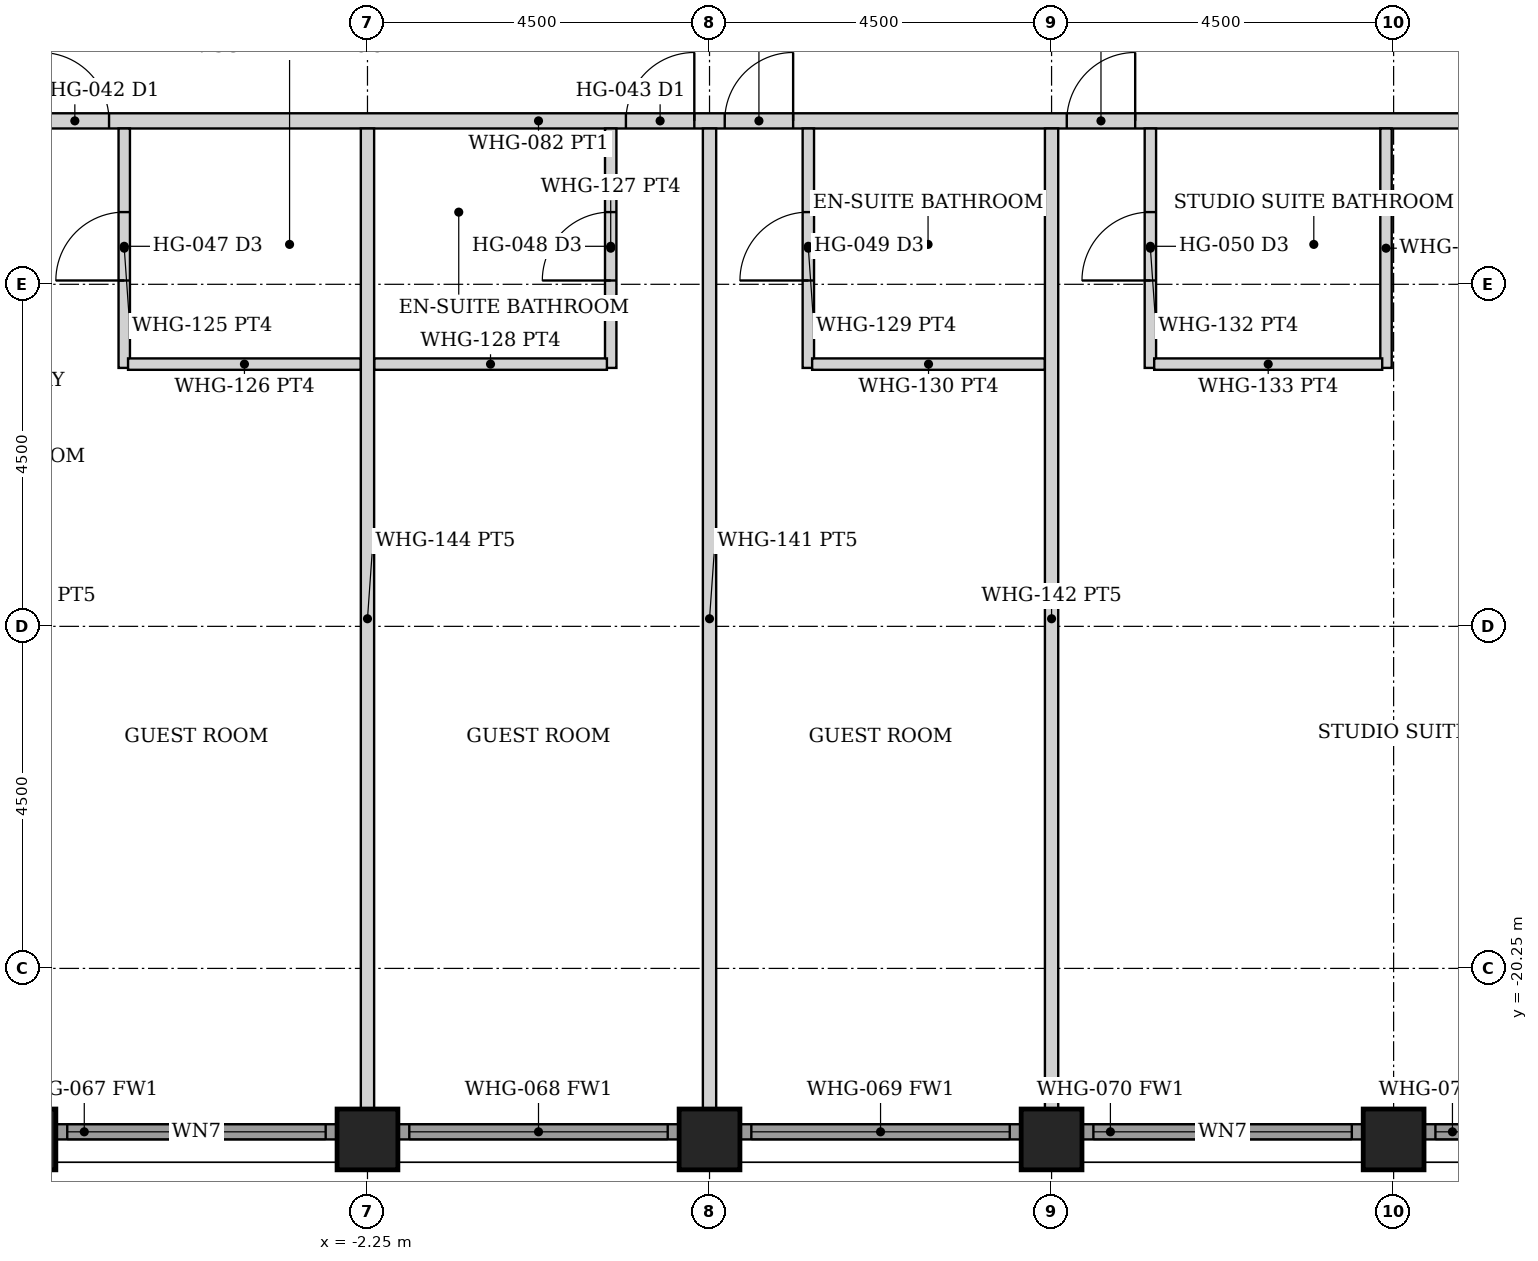
"""IFC4 building model, lengths in metres.
Left out: names, types, materials, properties, quantities, classifications, styles, units other than length and angle.
Written with IfcOpenShell. Run it as: python <this file> out.ifc"""

import sys

from ifc_helpers import new_model, si_unit, direction, frame, frame_2d, origin, origin_2d, place, context, subcontext, project, spatial, rectangle, hollow_rectangle, extrude, element, fill, save


model = new_model("IFC4")
c1 = context("Model", 3, precision=1e-05, world=origin(), true_north=direction((0.0, 1.0)))
c2 = subcontext(c1, "Body", "Model", "MODEL_VIEW")
j1 = project(units=[si_unit("LENGTHUNIT", "METRE"), si_unit("PLANEANGLEUNIT", "RADIAN")], contexts=[c1])
p1 = place(None, origin())
s1 = spatial("IfcSite", under=j1, at=p1, CompositionType="ELEMENT")
p2 = place(p1, origin())
s2 = spatial("IfcBuilding", under=s1, at=p2, CompositionType="ELEMENT")
p3 = place(p2, frame((0.0, 0.0, 186.8)))
s3 = spatial("IfcBuildingStorey", under=s2, at=p3, CompositionType="ELEMENT", Elevation=186.8)
for number, where, z_axis, x_axis in (
    (1, (-6.75, -22.5, 0.0), (0.0, 0.0, 1.0), (0.0, 1.0, 0.0)),
    (2, (-2.25, -22.5, 0.0), (0.0, 0.0, 1.0), (0.0, 1.0, 0.0)),
    (3, (2.25, -22.5, 0.0), (0.0, 0.0, 1.0), (0.0, 1.0, 0.0)),
    (4, (6.75, -22.5, 0.0), (0.0, 0.0, 1.0), (0.0, 1.0, 0.0)),
    (5, (11.25, -22.5, 0.0), (0.0, 0.0, 1.0), (0.0, 1.0, 0.0)),
):
    element("IfcColumn", number, at=place(p3, frame(where, z_axis=z_axis, x_axis=x_axis)), inside=s3, PredefinedType="COLUMN", context=c2, shape_type="SweptSolid", body=[
        extrude(hollow_rectangle(XDim=0.8, YDim=0.8, WallThickness=0.045, at=origin_2d()), origin(), (0.0, 0.0, 1.0), 3.6),
    ])
p4 = place(p3, frame((-6.345, -22.4, 0.0), z_axis=(0.0, 0.0, 1.0), x_axis=(1.0, 0.0, 0.0)))
e6 = element("IfcWall", 6, at=p4, inside=s3, PredefinedType="SOLIDWALL", context=c2, shape_type="SweptSolid", body=[
    extrude(rectangle(XDim=3.69, YDim=0.2, at=frame_2d((1.845, 0.0))), origin(), (0.0, 0.0, 1.0), 2.379),
])
p5 = place(p4, frame((0.145, 0.0, 0.3)))
e7 = element("IfcOpeningElement", 7, at=p5, cuts=e6, PredefinedType="OPENING", context=c2, shape_type="SweptSolid", body=[
    extrude(rectangle(XDim=3.4, YDim=1.929, at=frame_2d((1.7, 0.964))), frame((0.0, 0.11, 0.0), z_axis=(0.0, -1.0, 0.0), x_axis=(1.0, 0.0, 0.0)), (0.0, 0.0, 1.0), 0.22),
])
p6 = place(p3, frame((-1.845, -22.4, 0.0), z_axis=(0.0, 0.0, 1.0), x_axis=(1.0, 0.0, 0.0)))
e8 = element("IfcWall", 8, at=p6, inside=s3, PredefinedType="SOLIDWALL", context=c2, shape_type="SweptSolid", body=[
    extrude(rectangle(XDim=3.69, YDim=0.2, at=frame_2d((1.845, 0.0))), origin(), (0.0, 0.0, 1.0), 2.379),
])
p7 = place(p6, frame((0.145, 0.0, 0.3)))
e9 = element("IfcOpeningElement", 9, at=p7, cuts=e8, PredefinedType="OPENING", context=c2, shape_type="SweptSolid", body=[
    extrude(rectangle(XDim=3.4, YDim=1.929, at=frame_2d((1.7, 0.964))), frame((0.0, 0.11, 0.0), z_axis=(0.0, -1.0, 0.0), x_axis=(1.0, 0.0, 0.0)), (0.0, 0.0, 1.0), 0.22),
])
p8 = place(p3, frame((2.655, -22.4, 0.0), z_axis=(0.0, 0.0, 1.0), x_axis=(1.0, 0.0, 0.0)))
e10 = element("IfcWall", 10, at=p8, inside=s3, PredefinedType="SOLIDWALL", context=c2, shape_type="SweptSolid", body=[
    extrude(rectangle(XDim=3.69, YDim=0.2, at=frame_2d((1.845, 0.0))), origin(), (0.0, 0.0, 1.0), 2.379),
])
p9 = place(p8, frame((0.145, 0.0, 0.3)))
e11 = element("IfcOpeningElement", 11, at=p9, cuts=e10, PredefinedType="OPENING", context=c2, shape_type="SweptSolid", body=[
    extrude(rectangle(XDim=3.4, YDim=1.929, at=frame_2d((1.7, 0.964))), frame((0.0, 0.11, 0.0), z_axis=(0.0, -1.0, 0.0), x_axis=(1.0, 0.0, 0.0)), (0.0, 0.0, 1.0), 0.22),
])
p10 = place(p3, frame((7.155, -22.4, 0.0), z_axis=(0.0, 0.0, 1.0), x_axis=(1.0, 0.0, 0.0)))
e12 = element("IfcWall", 12, at=p10, inside=s3, PredefinedType="SOLIDWALL", context=c2, shape_type="SweptSolid", body=[
    extrude(rectangle(XDim=3.69, YDim=0.2, at=frame_2d((1.845, 0.0))), origin(), (0.0, 0.0, 1.0), 2.379),
])
p11 = place(p10, frame((0.145, 0.0, 0.3)))
e13 = element("IfcOpeningElement", 13, at=p11, cuts=e12, PredefinedType="OPENING", context=c2, shape_type="SweptSolid", body=[
    extrude(rectangle(XDim=3.4, YDim=1.929, at=frame_2d((1.7, 0.964))), frame((0.0, 0.11, 0.0), z_axis=(0.0, -1.0, 0.0), x_axis=(1.0, 0.0, 0.0)), (0.0, 0.0, 1.0), 0.22),
])
p12 = place(p3, frame((11.655, -22.4, 0.0), z_axis=(0.0, 0.0, 1.0), x_axis=(1.0, 0.0, 0.0)))
e14 = element("IfcWall", 14, at=p12, inside=s3, PredefinedType="SOLIDWALL", context=c2, shape_type="SweptSolid", body=[
    extrude(rectangle(XDim=3.69, YDim=0.2, at=frame_2d((1.845, 0.0))), origin(), (0.0, 0.0, 1.0), 2.379),
])
p13 = place(p12, frame((0.145, 0.0, 0.3)))
e15 = element("IfcOpeningElement", 15, at=p13, cuts=e14, PredefinedType="OPENING", context=c2, shape_type="SweptSolid", body=[
    extrude(rectangle(XDim=3.4, YDim=1.929, at=frame_2d((1.7, 0.964))), frame((0.0, 0.11, 0.0), z_axis=(0.0, -1.0, 0.0), x_axis=(1.0, 0.0, 0.0)), (0.0, 0.0, 1.0), 0.22),
])
p14 = place(p3, frame((-22.3, -9.1, 0.0), z_axis=(0.0, 0.0, 1.0), x_axis=(1.0, 0.0, 0.0)))
e16 = element("IfcWall", 16, at=p14, inside=s3, PredefinedType="PARTITIONING", context=c2, shape_type="SweptSolid", body=[
    extrude(rectangle(XDim=44.6, YDim=0.2, at=frame_2d((22.3, 0.0))), origin(), (0.0, 0.0, 1.0), 2.379),
])
p15 = place(p14, frame((11.35, 0.0, 0.0)))
e17 = element("IfcOpeningElement", 17, at=p15, cuts=e16, PredefinedType="OPENING", context=c2, shape_type="SweptSolid", body=[
    extrude(rectangle(XDim=0.9, YDim=2.1, at=frame_2d((0.45, 1.05))), frame((0.0, 0.11, 0.0), z_axis=(0.0, -1.0, 0.0), x_axis=(1.0, 0.0, 0.0)), (0.0, 0.0, 1.0), 0.22),
])
p16 = place(p14, frame((15.75, 0.0, 0.0)))
e18 = element("IfcOpeningElement", 18, at=p16, cuts=e16, PredefinedType="OPENING", context=c2, shape_type="SweptSolid", body=[
    extrude(rectangle(XDim=0.9, YDim=2.1, at=frame_2d((0.45, 1.05))), frame((0.0, 0.11, 0.0), z_axis=(0.0, -1.0, 0.0), x_axis=(1.0, 0.0, 0.0)), (0.0, 0.0, 1.0), 0.22),
])
p17 = place(p14, frame((23.45, 0.0, 0.0)))
e19 = element("IfcOpeningElement", 19, at=p17, cuts=e16, PredefinedType="OPENING", context=c2, shape_type="SweptSolid", body=[
    extrude(rectangle(XDim=0.9, YDim=2.1, at=frame_2d((0.45, 1.05))), frame((0.0, 0.11, 0.0), z_axis=(0.0, -1.0, 0.0), x_axis=(1.0, 0.0, 0.0)), (0.0, 0.0, 1.0), 0.22),
])
p18 = place(p14, frame((24.75, 0.0, 0.0)))
e20 = element("IfcOpeningElement", 20, at=p18, cuts=e16, PredefinedType="OPENING", context=c2, shape_type="SweptSolid", body=[
    extrude(rectangle(XDim=0.9, YDim=2.1, at=frame_2d((0.45, 1.05))), frame((0.0, 0.11, 0.0), z_axis=(0.0, -1.0, 0.0), x_axis=(1.0, 0.0, 0.0)), (0.0, 0.0, 1.0), 0.22),
])
p19 = place(p14, frame((29.25, 0.0, 0.0)))
e21 = element("IfcOpeningElement", 21, at=p19, cuts=e16, PredefinedType="OPENING", context=c2, shape_type="SweptSolid", body=[
    extrude(rectangle(XDim=0.9, YDim=2.1, at=frame_2d((0.45, 1.05))), frame((0.0, 0.11, 0.0), z_axis=(0.0, -1.0, 0.0), x_axis=(1.0, 0.0, 0.0)), (0.0, 0.0, 1.0), 0.22),
])
p20 = place(p14, frame((38.85, 0.0, 0.0)))
e22 = element("IfcOpeningElement", 22, at=p20, cuts=e16, PredefinedType="OPENING", context=c2, shape_type="SweptSolid", body=[
    extrude(rectangle(XDim=0.9, YDim=2.1, at=frame_2d((0.45, 1.05))), frame((0.0, 0.11, 0.0), z_axis=(0.0, -1.0, 0.0), x_axis=(1.0, 0.0, 0.0)), (0.0, 0.0, 1.0), 0.22),
])
p21 = place(p14, frame((4.85, 0.0, 0.0)))
e23 = element("IfcOpeningElement", 23, at=p21, cuts=e16, PredefinedType="OPENING", context=c2, shape_type="SweptSolid", body=[
    extrude(rectangle(XDim=0.9, YDim=2.1, at=frame_2d((0.45, 1.05))), frame((0.0, 0.11, 0.0), z_axis=(0.0, -1.0, 0.0), x_axis=(1.0, 0.0, 0.0)), (0.0, 0.0, 1.0), 0.22),
])
p22 = place(p3, frame((-5.45, -12.35, 0.0), z_axis=(0.0, 0.0, 1.0), x_axis=(0.0, 1.0, 0.0)))
e24 = element("IfcWall", 24, at=p22, inside=s3, PredefinedType="PARTITIONING", context=c2, shape_type="SweptSolid", body=[
    extrude(rectangle(XDim=3.15, YDim=0.15, at=frame_2d((1.575, 0.0))), origin(), (0.0, 0.0, 1.0), 2.379),
])
p23 = place(p22, frame((1.15, 0.0, 0.0)))
e25 = element("IfcOpeningElement", 25, at=p23, cuts=e24, PredefinedType="OPENING", context=c2, shape_type="SweptSolid", body=[
    extrude(rectangle(XDim=0.9, YDim=2.1, at=frame_2d((0.45, 1.05))), frame((0.0, 0.085, 0.0), z_axis=(0.0, -1.0, 0.0), x_axis=(1.0, 0.0, 0.0)), (0.0, 0.0, 1.0), 0.17),
])
p24 = place(p3, frame((-5.4, -12.3, 0.0), z_axis=(0.0, 0.0, 1.0), x_axis=(1.0, 0.0, 0.0)))
e26 = element("IfcWall", 26, at=p24, inside=s3, PredefinedType="PARTITIONING", context=c2, shape_type="SweptSolid", body=[
    extrude(rectangle(XDim=3.062, YDim=0.15, at=frame_2d((1.531, 0.0))), origin(), (0.0, 0.0, 1.0), 2.379),
])
p25 = place(p3, frame((0.95, -12.35, 0.0), z_axis=(0.0, 0.0, 1.0), x_axis=(0.0, 1.0, 0.0)))
e27 = element("IfcWall", 27, at=p25, inside=s3, PredefinedType="PARTITIONING", context=c2, shape_type="SweptSolid", body=[
    extrude(rectangle(XDim=3.15, YDim=0.15, at=frame_2d((1.575, 0.0))), origin(), (0.0, 0.0, 1.0), 2.379),
])
p26 = place(p25, frame((1.15, 0.0, 0.0)))
e28 = element("IfcOpeningElement", 28, at=p26, cuts=e27, PredefinedType="OPENING", context=c2, shape_type="SweptSolid", body=[
    extrude(rectangle(XDim=0.9, YDim=2.1, at=frame_2d((0.45, 1.05))), frame((0.0, 0.085, 0.0), z_axis=(0.0, -1.0, 0.0), x_axis=(1.0, 0.0, 0.0)), (0.0, 0.0, 1.0), 0.17),
])
p27 = place(p3, frame((-2.163, -12.3, 0.0), z_axis=(0.0, 0.0, 1.0), x_axis=(1.0, 0.0, 0.0)))
e29 = element("IfcWall", 29, at=p27, inside=s3, PredefinedType="PARTITIONING", context=c2, shape_type="SweptSolid", body=[
    extrude(rectangle(XDim=3.062, YDim=0.15, at=frame_2d((1.531, 0.0))), origin(), (0.0, 0.0, 1.0), 2.379),
])
p28 = place(p3, frame((3.55, -12.35, 0.0), z_axis=(0.0, 0.0, 1.0), x_axis=(0.0, 1.0, 0.0)))
e30 = element("IfcWall", 30, at=p28, inside=s3, PredefinedType="PARTITIONING", context=c2, shape_type="SweptSolid", body=[
    extrude(rectangle(XDim=3.15, YDim=0.15, at=frame_2d((1.575, 0.0))), origin(), (0.0, 0.0, 1.0), 2.379),
])
p29 = place(p28, frame((1.15, 0.0, 0.0)))
e31 = element("IfcOpeningElement", 31, at=p29, cuts=e30, PredefinedType="OPENING", context=c2, shape_type="SweptSolid", body=[
    extrude(rectangle(XDim=0.9, YDim=2.1, at=frame_2d((0.45, 1.05))), frame((0.0, 0.085, 0.0), z_axis=(0.0, -1.0, 0.0), x_axis=(1.0, 0.0, 0.0)), (0.0, 0.0, 1.0), 0.17),
])
p30 = place(p3, frame((3.6, -12.3, 0.0), z_axis=(0.0, 0.0, 1.0), x_axis=(1.0, 0.0, 0.0)))
e32 = element("IfcWall", 32, at=p30, inside=s3, PredefinedType="PARTITIONING", context=c2, shape_type="SweptSolid", body=[
    extrude(rectangle(XDim=3.062, YDim=0.15, at=frame_2d((1.531, 0.0))), origin(), (0.0, 0.0, 1.0), 2.379),
])
p31 = place(p3, frame((8.05, -12.35, 0.0), z_axis=(0.0, 0.0, 1.0), x_axis=(0.0, 1.0, 0.0)))
e33 = element("IfcWall", 33, at=p31, inside=s3, PredefinedType="PARTITIONING", context=c2, shape_type="SweptSolid", body=[
    extrude(rectangle(XDim=3.15, YDim=0.15, at=frame_2d((1.575, 0.0))), origin(), (0.0, 0.0, 1.0), 2.379),
])
p32 = place(p31, frame((1.15, 0.0, 0.0)))
e34 = element("IfcOpeningElement", 34, at=p32, cuts=e33, PredefinedType="OPENING", context=c2, shape_type="SweptSolid", body=[
    extrude(rectangle(XDim=0.9, YDim=2.1, at=frame_2d((0.45, 1.05))), frame((0.0, 0.085, 0.0), z_axis=(0.0, -1.0, 0.0), x_axis=(1.0, 0.0, 0.0)), (0.0, 0.0, 1.0), 0.17),
])
p33 = place(p3, frame((11.15, -12.35, 0.0), z_axis=(0.0, 0.0, 1.0), x_axis=(0.0, 1.0, 0.0)))
e35 = element("IfcWall", 35, at=p33, inside=s3, PredefinedType="PARTITIONING", context=c2, shape_type="SweptSolid", body=[
    extrude(rectangle(XDim=3.15, YDim=0.15, at=frame_2d((1.575, 0.0))), origin(), (0.0, 0.0, 1.0), 2.379),
])
p34 = place(p3, frame((8.1, -12.3, 0.0), z_axis=(0.0, 0.0, 1.0), x_axis=(1.0, 0.0, 0.0)))
e36 = element("IfcWall", 36, at=p34, inside=s3, PredefinedType="PARTITIONING", context=c2, shape_type="SweptSolid", body=[
    extrude(rectangle(XDim=3.0, YDim=0.15, at=frame_2d((1.5, 0.0))), origin(), (0.0, 0.0, 1.0), 2.379),
])
for number, where, z_axis, x_axis in (
    (37, (-2.25, -22.1, 0.0), (0.0, 0.0, 1.0), (0.0, 1.0, 0.0)),
    (38, (2.25, -22.1, 0.0), (0.0, 0.0, 1.0), (0.0, 1.0, 0.0)),
    (39, (6.75, -22.1, 0.0), (0.0, 0.0, 1.0), (0.0, 1.0, 0.0)),
):
    element("IfcWall", number, at=place(p3, frame(where, z_axis=z_axis, x_axis=x_axis)), inside=s3, PredefinedType="PARTITIONING", context=c2, shape_type="SweptSolid", body=[
        extrude(rectangle(XDim=12.9, YDim=0.175, at=frame_2d((6.45, 0.0))), origin(), (0.0, 0.0, 1.0), 2.379),
    ])
p35 = place(p5, origin())
e40 = element("IfcWindow", 40, at=p35, inside=s3, PartitioningType="SINGLE_PANEL", PredefinedType="WINDOW", context=c2, shape_type="SweptSolid", body=[
    extrude(rectangle(XDim=3.4, YDim=1.929, at=frame_2d((1.7, 0.964))), frame((0.0, 0.03, 0.0), z_axis=(0.0, -1.0, 0.0), x_axis=(1.0, 0.0, 0.0)), (0.0, 0.0, 1.0), 0.06),
])
fill(e7, e40)
p36 = place(p7, origin())
e41 = element("IfcWindow", 41, at=p36, inside=s3, PartitioningType="SINGLE_PANEL", PredefinedType="WINDOW", context=c2, shape_type="SweptSolid", body=[
    extrude(rectangle(XDim=3.4, YDim=1.929, at=frame_2d((1.7, 0.964))), frame((0.0, 0.03, 0.0), z_axis=(0.0, -1.0, 0.0), x_axis=(1.0, 0.0, 0.0)), (0.0, 0.0, 1.0), 0.06),
])
fill(e9, e41)
p37 = place(p9, origin())
e42 = element("IfcWindow", 42, at=p37, inside=s3, PartitioningType="SINGLE_PANEL", PredefinedType="WINDOW", context=c2, shape_type="SweptSolid", body=[
    extrude(rectangle(XDim=3.4, YDim=1.929, at=frame_2d((1.7, 0.964))), frame((0.0, 0.03, 0.0), z_axis=(0.0, -1.0, 0.0), x_axis=(1.0, 0.0, 0.0)), (0.0, 0.0, 1.0), 0.06),
])
fill(e11, e42)
p38 = place(p11, origin())
e43 = element("IfcWindow", 43, at=p38, inside=s3, PartitioningType="SINGLE_PANEL", PredefinedType="WINDOW", context=c2, shape_type="SweptSolid", body=[
    extrude(rectangle(XDim=3.4, YDim=1.929, at=frame_2d((1.7, 0.964))), frame((0.0, 0.03, 0.0), z_axis=(0.0, -1.0, 0.0), x_axis=(1.0, 0.0, 0.0)), (0.0, 0.0, 1.0), 0.06),
])
fill(e13, e43)
p39 = place(p13, origin())
e44 = element("IfcWindow", 44, at=p39, inside=s3, PartitioningType="SINGLE_PANEL", PredefinedType="WINDOW", context=c2, shape_type="SweptSolid", body=[
    extrude(rectangle(XDim=3.4, YDim=1.929, at=frame_2d((1.7, 0.964))), frame((0.0, 0.03, 0.0), z_axis=(0.0, -1.0, 0.0), x_axis=(1.0, 0.0, 0.0)), (0.0, 0.0, 1.0), 0.06),
])
fill(e15, e44)
p40 = place(p16, origin())
e45 = element("IfcDoor", 45, at=p40, inside=s3, OperationType="SINGLE_SWING_LEFT", PredefinedType="DOOR", context=c2, shape_type="SweptSolid", body=[
    extrude(rectangle(XDim=0.9, YDim=2.1, at=frame_2d((0.45, 1.05))), frame((0.0, 0.025, 0.0), z_axis=(0.0, -1.0, 0.0), x_axis=(1.0, 0.0, 0.0)), (0.0, 0.0, 1.0), 0.05),
])
fill(e18, e45)
p41 = place(p23, origin())
e46 = element("IfcDoor", 46, at=p41, inside=s3, OperationType="SINGLE_SWING_LEFT", PredefinedType="DOOR", context=c2, shape_type="SweptSolid", body=[
    extrude(rectangle(XDim=0.9, YDim=2.1, at=frame_2d((0.45, 1.05))), frame((0.0, 0.025, 0.0), z_axis=(0.0, -1.0, 0.0), x_axis=(1.0, 0.0, 0.0)), (0.0, 0.0, 1.0), 0.05),
])
fill(e25, e46)
p42 = place(p17, origin())
e47 = element("IfcDoor", 47, at=p42, inside=s3, OperationType="SINGLE_SWING_RIGHT", PredefinedType="DOOR", context=c2, shape_type="SweptSolid", body=[
    extrude(rectangle(XDim=0.9, YDim=2.1, at=frame_2d((0.45, 1.05))), frame((0.0, 0.025, 0.0), z_axis=(0.0, -1.0, 0.0), x_axis=(1.0, 0.0, 0.0)), (0.0, 0.0, 1.0), 0.05),
])
fill(e19, e47)
p43 = place(p26, origin())
e48 = element("IfcDoor", 48, at=p43, inside=s3, OperationType="SINGLE_SWING_LEFT", PredefinedType="DOOR", context=c2, shape_type="SweptSolid", body=[
    extrude(rectangle(XDim=0.9, YDim=2.1, at=frame_2d((0.45, 1.05))), frame((0.0, 0.025, 0.0), z_axis=(0.0, -1.0, 0.0), x_axis=(1.0, 0.0, 0.0)), (0.0, 0.0, 1.0), 0.05),
])
fill(e28, e48)
p44 = place(p18, origin())
e49 = element("IfcDoor", 49, at=p44, inside=s3, OperationType="SINGLE_SWING_RIGHT", PredefinedType="DOOR", context=c2, shape_type="SweptSolid", body=[
    extrude(rectangle(XDim=0.9, YDim=2.1, at=frame_2d((0.45, 1.05))), frame((0.0, 0.025, 0.0), z_axis=(0.0, -1.0, 0.0), x_axis=(1.0, 0.0, 0.0)), (0.0, 0.0, 1.0), 0.05),
])
fill(e20, e49)
p45 = place(p29, origin())
e50 = element("IfcDoor", 50, at=p45, inside=s3, OperationType="SINGLE_SWING_LEFT", PredefinedType="DOOR", context=c2, shape_type="SweptSolid", body=[
    extrude(rectangle(XDim=0.9, YDim=2.1, at=frame_2d((0.45, 1.05))), frame((0.0, 0.025, 0.0), z_axis=(0.0, -1.0, 0.0), x_axis=(1.0, 0.0, 0.0)), (0.0, 0.0, 1.0), 0.05),
])
fill(e31, e50)
p46 = place(p19, origin())
e51 = element("IfcDoor", 51, at=p46, inside=s3, OperationType="SINGLE_SWING_RIGHT", PredefinedType="DOOR", context=c2, shape_type="SweptSolid", body=[
    extrude(rectangle(XDim=0.9, YDim=2.1, at=frame_2d((0.45, 1.05))), frame((0.0, 0.025, 0.0), z_axis=(0.0, -1.0, 0.0), x_axis=(1.0, 0.0, 0.0)), (0.0, 0.0, 1.0), 0.05),
])
fill(e21, e51)
p47 = place(p32, origin())
e52 = element("IfcDoor", 52, at=p47, inside=s3, OperationType="SINGLE_SWING_LEFT", PredefinedType="DOOR", context=c2, shape_type="SweptSolid", body=[
    extrude(rectangle(XDim=0.9, YDim=2.1, at=frame_2d((0.45, 1.05))), frame((0.0, 0.025, 0.0), z_axis=(0.0, -1.0, 0.0), x_axis=(1.0, 0.0, 0.0)), (0.0, 0.0, 1.0), 0.05),
])
fill(e34, e52)
save(model, sys.argv[1])
